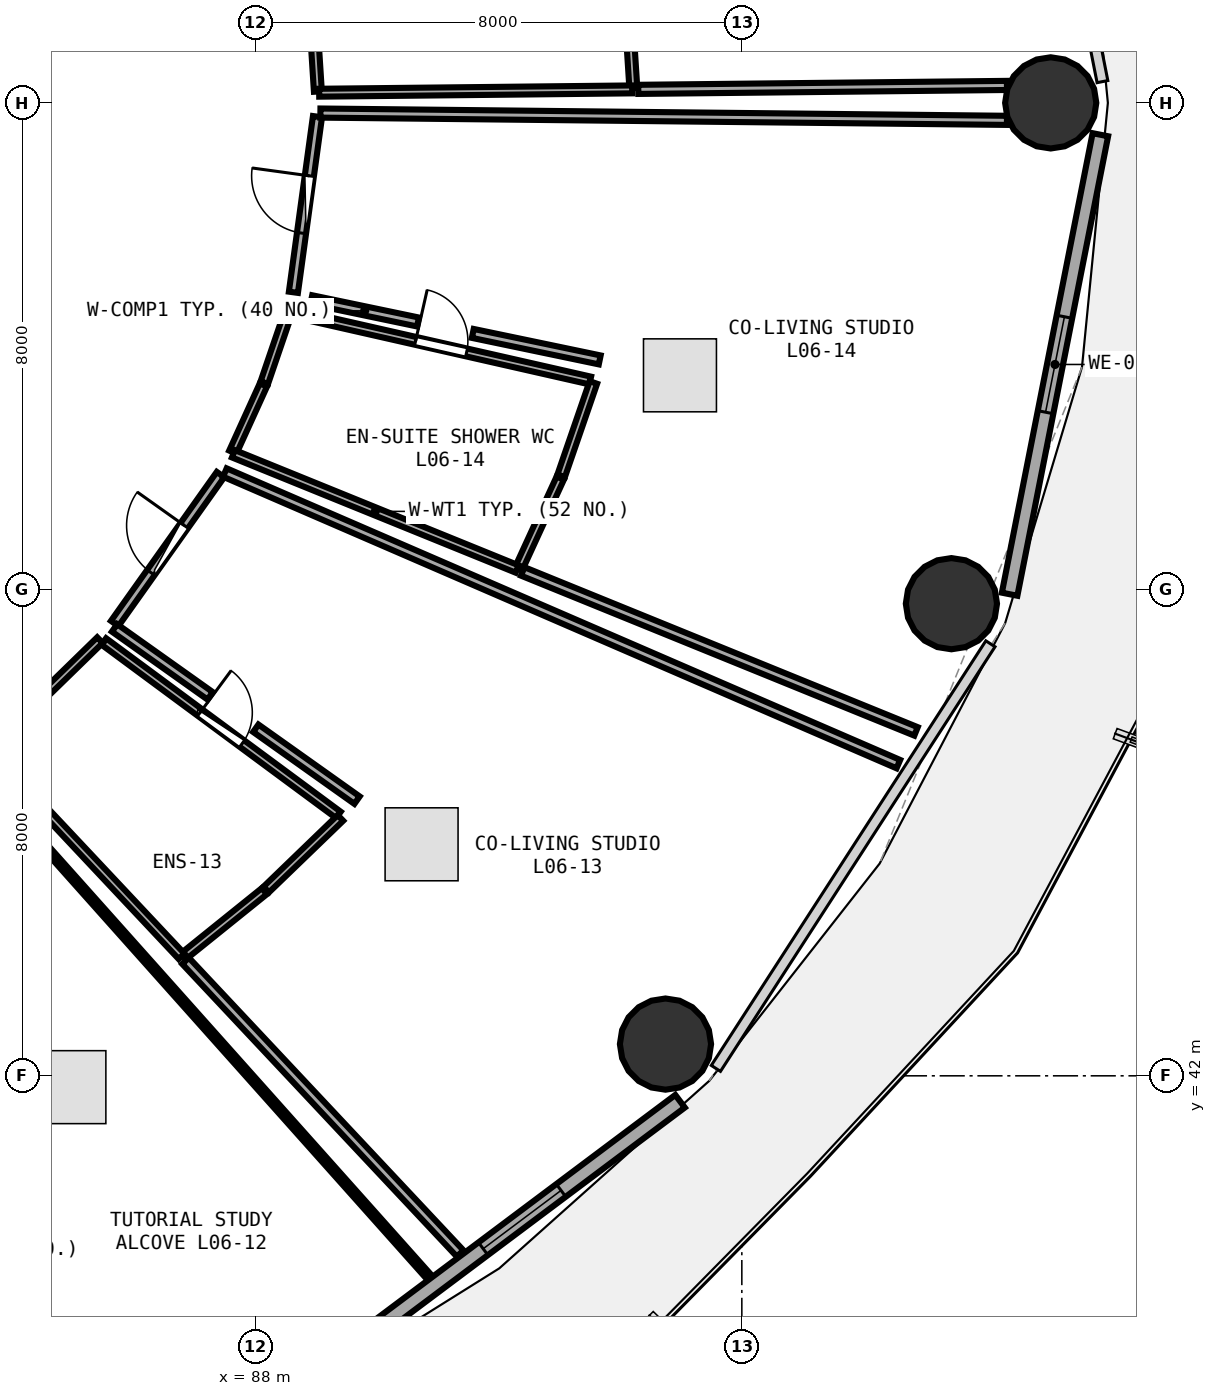
"""IFC4 building model, lengths in metres.
Left out: names, types, materials, properties, quantities, classifications, styles, units other than length and angle.
Written with IfcOpenShell. Run it as: python <this file> out.ifc"""

import sys

from ifc_helpers import new_model, si_unit, direction, frame, frame_2d, origin, origin_2d, place, context, subcontext, project, spatial, rectangle, circle, extrude, element, fill, save


model = new_model("IFC4")
c1 = context("Model", 3, precision=1e-05, world=origin(), true_north=direction((0.0, 1.0)))
c2 = subcontext(c1, "Body", "Model", "MODEL_VIEW")
j1 = project(units=[si_unit("LENGTHUNIT", "METRE"), si_unit("PLANEANGLEUNIT", "RADIAN")], contexts=[c1])
p1 = place(None, origin())
s1 = spatial("IfcSite", under=j1, at=p1, CompositionType="ELEMENT")
p2 = place(p1, origin())
s2 = spatial("IfcBuilding", under=s1, at=p2, CompositionType="ELEMENT")
p3 = place(p2, frame((0.0, 0.0, 26.25)))
s3 = spatial("IfcBuildingStorey", under=s2, at=p3, CompositionType="ELEMENT", Elevation=26.25)
for number, where, z_axis, x_axis in (
    (1, (101.08, 58.0, 0.0), (0.0, 0.0, 1.0), (1.0, 0.0, 0.0)),
    (2, (94.744, 42.522, 0.0), (0.0, 0.0, 1.0), (1.0, 0.0, 0.0)),
    (3, (99.447, 49.764, 0.0), (0.0, 0.0, 1.0), (1.0, 0.0, 0.0)),
):
    element("IfcColumn", number, at=place(p3, frame(where, z_axis=z_axis, x_axis=x_axis)), inside=s3, PredefinedType="COLUMN", context=c2, shape_type="SweptSolid", body=[
        extrude(circle(Radius=0.75, at=origin_2d()), origin(), (0.0, 0.0, 1.0), 3.75),
    ])
p4 = place(p3, frame((88.349, 36.611, 0.0), z_axis=(0.0, 0.0, 1.0), x_axis=(0.80030733173, 0.599590005569, 0.0)))
e4 = element("IfcWall", 4, at=p4, inside=s3, PredefinedType="SOLIDWALL", context=c2, shape_type="SweptSolid", body=[
    extrude(rectangle(XDim=8.291, YDim=0.26, at=frame_2d((4.145, 0.0))), origin(), (0.0, 0.0, 1.0), 3.475),
])
p5 = place(p4, frame((4.245, 0.0, 0.85)))
e5 = element("IfcOpeningElement", 5, at=p5, cuts=e4, PredefinedType="OPENING", context=c2, shape_type="SweptSolid", body=[
    extrude(rectangle(XDim=1.6, YDim=1.45, at=frame_2d((0.8, 0.725))), frame((0.0, 0.14, 0.0), z_axis=(0.0, -1.0, 0.0), x_axis=(1.0, 0.0, 0.0)), (0.0, 0.0, 1.0), 0.28),
])
p6 = place(p3, frame((100.404, 49.92, 0.0), z_axis=(0.0, 0.0, 1.0), x_axis=(0.193726159581, 0.98105564322, 0.0)))
e6 = element("IfcWall", 6, at=p6, inside=s3, PredefinedType="SOLIDWALL", context=c2, shape_type="SweptSolid", body=[
    extrude(rectangle(XDim=7.703, YDim=0.26, at=frame_2d((3.851, 0.0))), origin(), (0.0, 0.0, 1.0), 3.475),
])
p7 = place(p6, frame((3.051, 0.0, 0.85)))
e7 = element("IfcOpeningElement", 7, at=p7, cuts=e6, PredefinedType="OPENING", context=c2, shape_type="SweptSolid", body=[
    extrude(rectangle(XDim=1.6, YDim=1.45, at=frame_2d((0.8, 0.725))), frame((0.0, 0.14, 0.0), z_axis=(0.0, -1.0, 0.0), x_axis=(1.0, 0.0, 0.0)), (0.0, 0.0, 1.0), 0.28),
])
p8 = place(p3, frame((85.506, 49.143, 0.0), z_axis=(0.0, 0.0, 1.0), x_axis=(0.80412644244, -0.594458295063, 0.0)))
e8 = element("IfcWall", 8, at=p8, inside=s3, PredefinedType="PLUMBINGWALL", context=c2, shape_type="SweptSolid", body=[
    extrude(rectangle(XDim=4.799, YDim=0.13, at=frame_2d((2.399, 0.0))), origin(), (0.0, 0.0, 1.0), 2.875),
])
p9 = place(p8, frame((1.969, 0.0, 0.0)))
e9 = element("IfcOpeningElement", 9, at=p9, cuts=e8, PredefinedType="OPENING", context=c2, shape_type="SweptSolid", body=[
    extrude(rectangle(XDim=0.86, YDim=2.05, at=frame_2d((0.43, 1.025))), frame((0.0, 0.075, 0.0), z_axis=(0.0, -1.0, 0.0), x_axis=(1.0, 0.0, 0.0)), (0.0, 0.0, 1.0), 0.15),
])
p10 = place(p3, frame((85.686, 49.438, 0.0), z_axis=(0.0, 0.0, 1.0), x_axis=(0.579107689823, 0.815251055557, 0.0)))
e10 = element("IfcWall", 10, at=p10, inside=s3, PredefinedType="PARTITIONING", context=c2, shape_type="SweptSolid", body=[
    extrude(rectangle(XDim=3.005, YDim=0.15, at=frame_2d((1.503, 0.0))), origin(), (0.0, 0.0, 1.0), 2.875),
])
p11 = place(p10, frame((1.028, 0.0, 0.0)))
e11 = element("IfcOpeningElement", 11, at=p11, cuts=e10, PredefinedType="OPENING", context=c2, shape_type="SweptSolid", body=[
    extrude(rectangle(XDim=0.95, YDim=2.08, at=frame_2d((0.475, 1.04))), frame((0.0, 0.085, 0.0), z_axis=(0.0, -1.0, 0.0), x_axis=(1.0, 0.0, 0.0)), (0.0, 0.0, 1.0), 0.17),
])
p12 = place(p3, frame((88.603, 54.548, 0.0), z_axis=(0.0, 0.0, 1.0), x_axis=(0.975187669184, -0.221379786503, 0.0)))
e12 = element("IfcWall", 12, at=p12, inside=s3, PredefinedType="PLUMBINGWALL", context=c2, shape_type="SweptSolid", body=[
    extrude(rectangle(XDim=5.029, YDim=0.13, at=frame_2d((2.514, 0.0))), origin(), (0.0, 0.0, 1.0), 3.175),
])
p13 = place(p12, frame((2.084, 0.0, 0.0)))
e13 = element("IfcOpeningElement", 13, at=p13, cuts=e12, PredefinedType="OPENING", context=c2, shape_type="SweptSolid", body=[
    extrude(rectangle(XDim=0.86, YDim=2.05, at=frame_2d((0.43, 1.025))), frame((0.0, 0.075, 0.0), z_axis=(0.0, -1.0, 0.0), x_axis=(1.0, 0.0, 0.0)), (0.0, 0.0, 1.0), 0.15),
])
p14 = place(p3, frame((88.625, 54.885, 0.0), z_axis=(0.0, 0.0, 1.0), x_axis=(0.135838186105, 0.990731036758, 0.0)))
e14 = element("IfcWall", 14, at=p14, inside=s3, PredefinedType="PARTITIONING", context=c2, shape_type="SweptSolid", body=[
    extrude(rectangle(XDim=2.915, YDim=0.15, at=frame_2d((1.458, 0.0))), origin(), (0.0, 0.0, 1.0), 3.48),
])
p15 = place(p14, frame((0.983, 0.0, 0.0)))
e15 = element("IfcOpeningElement", 15, at=p15, cuts=e14, PredefinedType="OPENING", context=c2, shape_type="SweptSolid", body=[
    extrude(rectangle(XDim=0.95, YDim=2.08, at=frame_2d((0.475, 1.04))), frame((0.0, 0.085, 0.0), z_axis=(0.0, -1.0, 0.0), x_axis=(1.0, 0.0, 0.0)), (0.0, 0.0, 1.0), 0.17),
])
p16 = place(p3, frame((89.028, 58.187, 0.0), z_axis=(0.0, 0.0, 1.0), x_axis=(-0.063661240763, 0.99797156594, 0.0)))
e16 = element("IfcWall", 16, at=p16, inside=s3, PredefinedType="PLUMBINGWALL", context=c2, shape_type="SweptSolid", body=[
    extrude(rectangle(XDim=1.197, YDim=0.13, at=frame_2d((0.598, 0.0))), origin(), (0.0, 0.0, 1.0), 2.875),
])
p17 = place(p3, frame((94.113, 59.845, 0.0), z_axis=(0.0, 0.0, 1.0), x_axis=(0.06383542257, -0.997960439509, 0.0)))
e17 = element("IfcWall", 17, at=p17, inside=s3, PredefinedType="PLUMBINGWALL", context=c2, shape_type="SweptSolid", body=[
    extrude(rectangle(XDim=1.606, YDim=0.13, at=frame_2d((0.803, 0.0))), origin(), (0.0, 0.0, 1.0), 3.48),
])
p18 = place(p3, frame((94.197, 58.222, 0.0), z_axis=(0.0, 0.0, 1.0), x_axis=(-0.999944081579, -0.010575146078, 0.0)))
e18 = element("IfcWall", 18, at=p18, inside=s3, PredefinedType="PLUMBINGWALL", context=c2, shape_type="SweptSolid", body=[
    extrude(rectangle(XDim=5.148, YDim=0.13, at=frame_2d((2.574, 0.0))), origin(), (0.0, 0.0, 1.0), 2.875),
])
p19 = place(p3, frame((100.36, 58.287, 0.0), z_axis=(0.0, 0.0, 1.0), x_axis=(-0.999943071294, -0.010670246996, 0.0)))
e19 = element("IfcWall", 19, at=p19, inside=s3, PredefinedType="PARTITIONING", context=c2, shape_type="SweptSolid", body=[
    extrude(rectangle(XDim=6.063, YDim=0.15, at=frame_2d((3.032, 0.0))), origin(), (0.0, 0.0, 1.0), 3.235),
])
p20 = place(p3, frame((83.254, 47.211, 0.0), z_axis=(0.0, 0.0, 1.0), x_axis=(0.66580890104, -0.746122313897, 0.0)))
e20 = element("IfcWall", 20, at=p20, inside=s3, PredefinedType="PARTITIONING", context=c2, shape_type="SweptSolid", body=[
    extrude(rectangle(XDim=11.399, YDim=0.1, at=frame_2d((5.7, 0.0))), origin(), (0.0, 0.0, 1.0), 2.875),
])
p21 = place(p3, frame((85.401, 35.769, 0.0), z_axis=(0.0, 0.0, 1.0), x_axis=(-0.464308397246, 0.885673592384, 0.0)))
e21 = element("IfcWall", 21, at=p21, inside=s3, PredefinedType="PARTITIONING", context=c2, shape_type="SweptSolid", body=[
    extrude(rectangle(XDim=9.17, YDim=0.1, at=frame_2d((4.585, 0.0))), origin(), (0.0, 0.0, 1.0), 2.875),
])
p22 = place(p3, frame((84.543, 48.287, 0.0), z_axis=(0.0, 0.0, 1.0), x_axis=(0.715980731769, 0.698120041064, 0.0)))
e22 = element("IfcWall", 22, at=p22, inside=s3, PredefinedType="PLUMBINGWALL", context=c2, shape_type="SweptSolid", body=[
    extrude(rectangle(XDim=1.258, YDim=0.13, at=frame_2d((0.629, 0.0))), origin(), (0.0, 0.0, 1.0), 2.875),
])
p23 = place(p3, frame((89.399, 46.241, 0.0), z_axis=(0.0, 0.0, 1.0), x_axis=(-0.719664402118, -0.694322078234, 0.0)))
e23 = element("IfcWall", 23, at=p23, inside=s3, PredefinedType="PLUMBINGWALL", context=c2, shape_type="SweptSolid", body=[
    extrude(rectangle(XDim=1.696, YDim=0.13, at=frame_2d((0.848, 0.0))), origin(), (0.0, 0.0, 1.0), 2.875),
])
p24 = place(p3, frame((88.148, 45.038, 0.0), z_axis=(0.0, 0.0, 1.0), x_axis=(-0.778806140639, -0.627264693174, 0.0)))
e24 = element("IfcWall", 24, at=p24, inside=s3, PredefinedType="PLUMBINGWALL", context=c2, shape_type="SweptSolid", body=[
    extrude(rectangle(XDim=1.713, YDim=0.13, at=frame_2d((0.856, 0.0))), origin(), (0.0, 0.0, 1.0), 3.175),
])
p25 = place(p3, frame((86.785, 43.966, 0.0), z_axis=(0.0, 0.0, 1.0), x_axis=(-0.68469858897, 0.728826345753, 0.0)))
e25 = element("IfcWall", 25, at=p25, inside=s3, PredefinedType="PLUMBINGWALL", context=c2, shape_type="SweptSolid", body=[
    extrude(rectangle(XDim=4.758, YDim=0.13, at=frame_2d((2.379, 0.0))), origin(), (0.0, 0.0, 1.0), 2.875),
])
p26 = place(p3, frame((87.498, 51.921, 0.0), z_axis=(0.0, 0.0, 1.0), x_axis=(0.917695041134, -0.397285554077, 0.0)))
e26 = element("IfcWall", 26, at=p26, inside=s3, PredefinedType="PARTITIONING", context=c2, shape_type="SweptSolid", body=[
    extrude(rectangle(XDim=12.07, YDim=0.15, at=frame_2d((6.035, 0.0))), origin(), (0.0, 0.0, 1.0), 2.875),
])
p27 = place(p3, frame((91.368, 39.078, 0.0), z_axis=(0.0, 0.0, 1.0), x_axis=(-0.684296653493, 0.729203736975, 0.0)))
e27 = element("IfcWall", 27, at=p27, inside=s3, PredefinedType="PARTITIONING", context=c2, shape_type="SweptSolid", body=[
    extrude(rectangle(XDim=6.6, YDim=0.15, at=frame_2d((3.3, 0.0))), origin(), (0.0, 0.0, 1.0), 2.875),
])
p28 = place(p3, frame((89.671, 46.533, 0.0), z_axis=(0.0, 0.0, 1.0), x_axis=(-0.815281399299, 0.579064970411, 0.0)))
e28 = element("IfcWall", 28, at=p28, inside=s3, PredefinedType="PARTITIONING", context=c2, shape_type="SweptSolid", body=[
    extrude(rectangle(XDim=2.042, YDim=0.15, at=frame_2d((1.021, 0.0))), origin(), (0.0, 0.0, 1.0), 3.48),
])
p29 = place(p3, frame((87.256, 48.249, 0.0), z_axis=(0.0, 0.0, 1.0), x_axis=(-0.815270043711, 0.579080957922, 0.0)))
e29 = element("IfcWall", 29, at=p29, inside=s3, PredefinedType="PARTITIONING", context=c2, shape_type="SweptSolid", body=[
    extrude(rectangle(XDim=1.929, YDim=0.15, at=frame_2d((0.964, 0.0))), origin(), (0.0, 0.0, 1.0), 3.235),
])
p30 = place(p3, frame((87.628, 52.255, 0.0), z_axis=(0.0, 0.0, 1.0), x_axis=(0.4138937247, 0.910325208183, 0.0)))
e30 = element("IfcWall", 30, at=p30, inside=s3, PredefinedType="PLUMBINGWALL", context=c2, shape_type="SweptSolid", body=[
    extrude(rectangle(XDim=1.216, YDim=0.13, at=frame_2d((0.608, 0.0))), origin(), (0.0, 0.0, 1.0), 3.48),
])
p31 = place(p3, frame((88.146, 53.399, 0.0), z_axis=(0.0, 0.0, 1.0), x_axis=(0.323735286305, 0.946147696928, 0.0)))
e31 = element("IfcWall", 31, at=p31, inside=s3, PredefinedType="PLUMBINGWALL", context=c2, shape_type="SweptSolid", body=[
    extrude(rectangle(XDim=1.208, YDim=0.13, at=frame_2d((0.604, 0.0))), origin(), (0.0, 0.0, 1.0), 3.48),
])
p32 = place(p3, frame((93.559, 53.402, 0.0), z_axis=(0.0, 0.0, 1.0), x_axis=(-0.326356647952, -0.945246707657, 0.0)))
e32 = element("IfcWall", 32, at=p32, inside=s3, PredefinedType="PLUMBINGWALL", context=c2, shape_type="SweptSolid", body=[
    extrude(rectangle(XDim=1.624, YDim=0.13, at=frame_2d((0.812, 0.0))), origin(), (0.0, 0.0, 1.0), 3.48),
])
p33 = place(p3, frame((93.014, 51.83, 0.0), z_axis=(0.0, 0.0, 1.0), x_axis=(-0.41762687648, -0.908618617486, 0.0)))
e33 = element("IfcWall", 33, at=p33, inside=s3, PredefinedType="PLUMBINGWALL", context=c2, shape_type="SweptSolid", body=[
    extrude(rectangle(XDim=1.634, YDim=0.13, at=frame_2d((0.817, 0.0))), origin(), (0.0, 0.0, 1.0), 2.875),
])
p34 = place(p3, frame((92.304, 50.334, 0.0), z_axis=(0.0, 0.0, 1.0), x_axis=(-0.926504606816, 0.376283421835, 0.0)))
e34 = element("IfcWall", 34, at=p34, inside=s3, PredefinedType="PLUMBINGWALL", context=c2, shape_type="SweptSolid", body=[
    extrude(rectangle(XDim=5.036, YDim=0.13, at=frame_2d((2.518, 0.0))), origin(), (0.0, 0.0, 1.0), 2.875),
])
p35 = place(p3, frame((89.069, 57.833, 0.0), z_axis=(0.0, 0.0, 1.0), x_axis=(0.999943877154, -0.010594458135, 0.0)))
e35 = element("IfcWall", 35, at=p35, inside=s3, PredefinedType="PARTITIONING", context=c2, shape_type="SweptSolid", body=[
    extrude(rectangle(XDim=11.292, YDim=0.15, at=frame_2d((5.646, 0.0))), origin(), (0.0, 0.0, 1.0), 2.875),
])
p36 = place(p3, frame((98.865, 47.664, 0.0), z_axis=(0.0, 0.0, 1.0), x_axis=(-0.926325178802, 0.376724917038, 0.0)))
e36 = element("IfcWall", 36, at=p36, inside=s3, PredefinedType="PARTITIONING", context=c2, shape_type="SweptSolid", body=[
    extrude(rectangle(XDim=6.983, YDim=0.15, at=frame_2d((3.492, 0.0))), origin(), (0.0, 0.0, 1.0), 2.875),
])
p37 = place(p3, frame((93.663, 53.773, 0.0), z_axis=(0.0, 0.0, 1.0), x_axis=(-0.978922282622, 0.204233113343, 0.0)))
e37 = element("IfcWall", 37, at=p37, inside=s3, PredefinedType="PARTITIONING", context=c2, shape_type="SweptSolid", body=[
    extrude(rectangle(XDim=2.133, YDim=0.15, at=frame_2d((1.066, 0.0))), origin(), (0.0, 0.0, 1.0), 3.175),
])
p38 = place(p3, frame((90.675, 54.397, 0.0), z_axis=(0.0, 0.0, 1.0), x_axis=(-0.978929424395, 0.204198878681, 0.0)))
e38 = element("IfcWall", 38, at=p38, inside=s3, PredefinedType="PARTITIONING", context=c2, shape_type="SweptSolid", body=[
    extrude(rectangle(XDim=1.793, YDim=0.15, at=frame_2d((0.897, 0.0))), origin(), (0.0, 0.0, 1.0), 3.235),
])
p39 = place(p5, origin())
e39 = element("IfcWindow", 39, at=p39, inside=s3, PartitioningType="SINGLE_PANEL", PredefinedType="WINDOW", context=c2, shape_type="SweptSolid", body=[
    extrude(rectangle(XDim=1.6, YDim=1.45, at=frame_2d((0.8, 0.725))), frame((0.0, 0.03, 0.0), z_axis=(0.0, -1.0, 0.0), x_axis=(1.0, 0.0, 0.0)), (0.0, 0.0, 1.0), 0.06),
])
fill(e5, e39)
p40 = place(p7, origin())
e40 = element("IfcWindow", 40, at=p40, inside=s3, PartitioningType="SINGLE_PANEL", PredefinedType="WINDOW", context=c2, shape_type="SweptSolid", body=[
    extrude(rectangle(XDim=1.6, YDim=1.45, at=frame_2d((0.8, 0.725))), frame((0.0, 0.03, 0.0), z_axis=(0.0, -1.0, 0.0), x_axis=(1.0, 0.0, 0.0)), (0.0, 0.0, 1.0), 0.06),
])
fill(e7, e40)
p41 = place(p9, origin())
e41 = element("IfcDoor", 41, at=p41, inside=s3, OperationType="SINGLE_SWING_LEFT", PredefinedType="DOOR", context=c2, shape_type="SweptSolid", body=[
    extrude(rectangle(XDim=0.86, YDim=2.05, at=frame_2d((0.43, 1.025))), frame((0.0, 0.025, 0.0), z_axis=(0.0, -1.0, 0.0), x_axis=(1.0, 0.0, 0.0)), (0.0, 0.0, 1.0), 0.05),
])
fill(e9, e41)
p42 = place(p11, origin())
e42 = element("IfcDoor", 42, at=p42, inside=s3, OperationType="SINGLE_SWING_RIGHT", PredefinedType="DOOR", context=c2, shape_type="SweptSolid", body=[
    extrude(rectangle(XDim=0.95, YDim=2.08, at=frame_2d((0.475, 1.04))), frame((0.0, 0.025, 0.0), z_axis=(0.0, -1.0, 0.0), x_axis=(1.0, 0.0, 0.0)), (0.0, 0.0, 1.0), 0.05),
])
fill(e11, e42)
p43 = place(p13, origin())
e43 = element("IfcDoor", 43, at=p43, inside=s3, OperationType="SINGLE_SWING_LEFT", PredefinedType="DOOR", context=c2, shape_type="SweptSolid", body=[
    extrude(rectangle(XDim=0.86, YDim=2.05, at=frame_2d((0.43, 1.025))), frame((0.0, 0.025, 0.0), z_axis=(0.0, -1.0, 0.0), x_axis=(1.0, 0.0, 0.0)), (0.0, 0.0, 1.0), 0.05),
])
fill(e13, e43)
p44 = place(p15, origin())
e44 = element("IfcDoor", 44, at=p44, inside=s3, OperationType="SINGLE_SWING_RIGHT", PredefinedType="DOOR", context=c2, shape_type="SweptSolid", body=[
    extrude(rectangle(XDim=0.95, YDim=2.08, at=frame_2d((0.475, 1.04))), frame((0.0, 0.025, 0.0), z_axis=(0.0, -1.0, 0.0), x_axis=(1.0, 0.0, 0.0)), (0.0, 0.0, 1.0), 0.05),
])
fill(e15, e44)
save(model, sys.argv[1])
